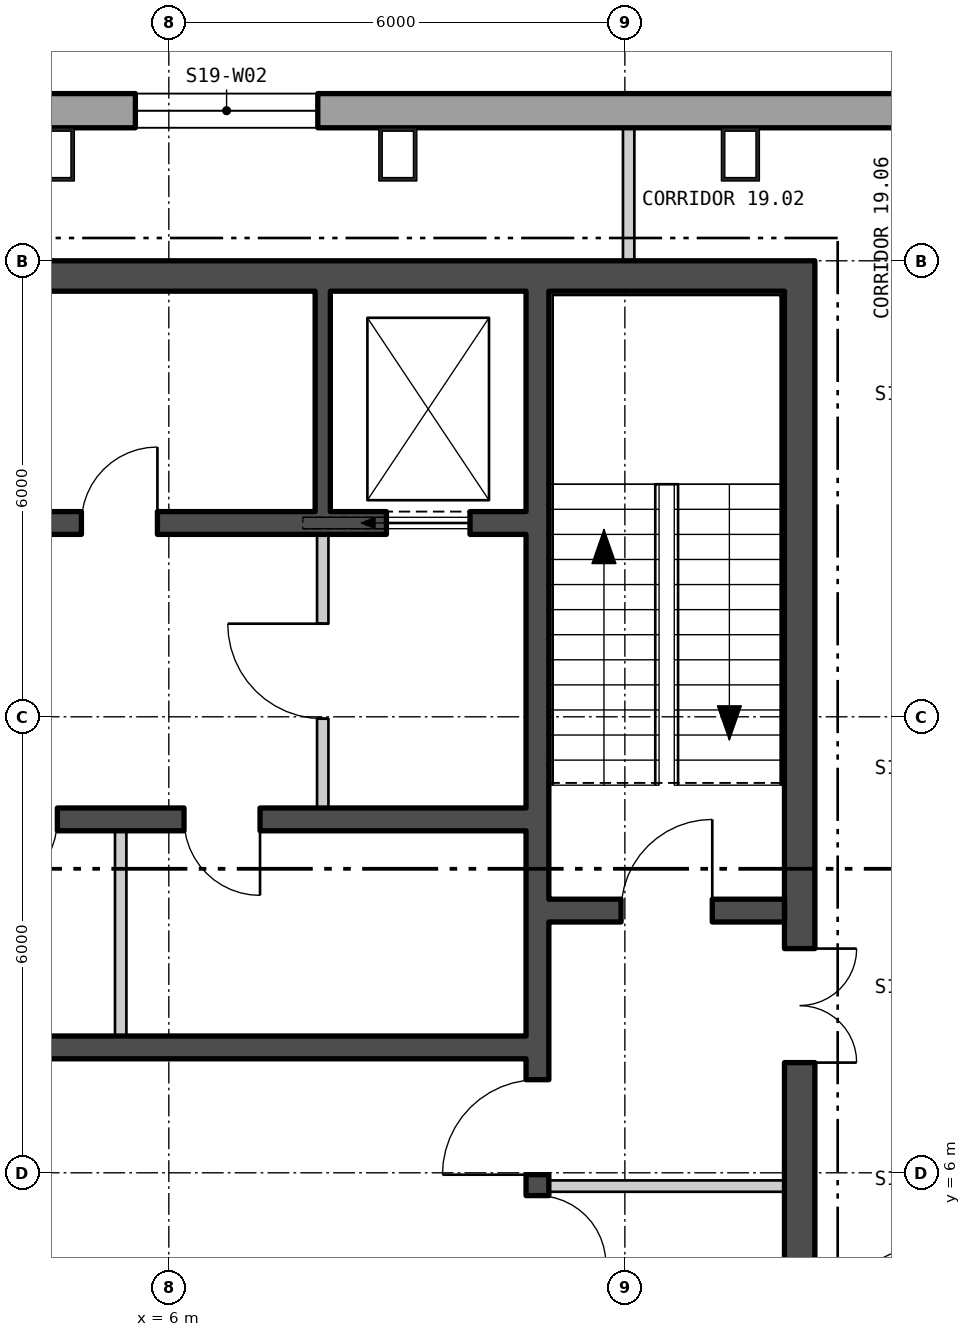
"""IFC4 building model, lengths in metres.
Left out: names, types, materials, properties, quantities, classifications, styles, units other than length and angle.
Written with IfcOpenShell. Run it as: python <this file> out.ifc"""

import sys

from ifc_helpers import new_model, si_unit, direction, frame, frame_2d, origin, origin_2d, place, context, subcontext, project, spatial, polyline, rectangle, hollow_rectangle, outline, extrude, element, fill, save


model = new_model("IFC4")
c1 = context("Model", 3, precision=1e-05, world=origin(), true_north=direction((0.0, 1.0)))
c2 = subcontext(c1, "Body", "Model", "MODEL_VIEW")
j1 = project(units=[si_unit("LENGTHUNIT", "METRE"), si_unit("PLANEANGLEUNIT", "RADIAN")], contexts=[c1])
p1 = place(None, origin())
s1 = spatial("IfcSite", under=j1, at=p1, CompositionType="ELEMENT")
p2 = place(p1, origin())
s2 = spatial("IfcBuilding", under=s1, at=p2, CompositionType="ELEMENT")
p3 = place(p2, frame((0.0, 0.0, 257.1)))
s3 = spatial("IfcBuildingStorey", under=s2, at=p3, CompositionType="ELEMENT", Elevation=257.1)
for number, where, z_axis, x_axis in (
    (1, (13.52, 19.4, 0.0), (0.0, 0.0, 1.0), (-1.0, 0.0, 0.0)),
    (2, (9.013, 19.4, 0.0), (0.0, 0.0, 1.0), (-1.0, 0.0, 0.0)),
    (3, (4.507, 19.4, 0.0), (0.0, 0.0, 1.0), (-1.0, 0.0, 0.0)),
):
    element("IfcColumn", number, at=place(p3, frame(where, z_axis=z_axis, x_axis=x_axis)), inside=s3, PredefinedType="COLUMN", context=c2, shape_type="SweptSolid", body=[
        extrude(hollow_rectangle(XDim=0.5, YDim=0.7, WallThickness=0.045, at=origin_2d()), origin(), (0.0, 0.0, 1.0), 3.9),
    ])
p4 = place(p3, frame((22.865, 19.975, -0.4), z_axis=(0.0, 0.0, 1.0), x_axis=(-1.0, 0.0, 0.0)))
e4 = element("IfcWall", 4, at=p4, inside=s3, PredefinedType="SOLIDWALL", context=c2, shape_type="SweptSolid", body=[
    extrude(outline(polyline([(-0.13, -0.225), (45.86, -0.225), (45.6, 0.225), (0.13, 0.225), (-0.13, -0.225)])), origin(), (0.0, 0.0, 1.0), 3.9),
])
p5 = place(p4, frame((1.424, 0.0, 1.3)))
e5 = element("IfcOpeningElement", 5, at=p5, cuts=e4, PredefinedType="OPENING", context=c2, shape_type="SweptSolid", body=[
    extrude(rectangle(XDim=2.4, YDim=2.0, at=frame_2d((1.2, 1.0))), frame((0.0, 0.235, 0.0), z_axis=(0.0, -1.0, 0.0), x_axis=(1.0, 0.0, 0.0)), (0.0, 0.0, 1.0), 0.47),
])
p6 = place(p4, frame((14.905, 0.0, 1.3)))
e6 = element("IfcOpeningElement", 6, at=p6, cuts=e4, PredefinedType="OPENING", context=c2, shape_type="SweptSolid", body=[
    extrude(rectangle(XDim=2.4, YDim=2.0, at=frame_2d((1.2, 1.0))), frame((0.0, 0.235, 0.0), z_axis=(0.0, -1.0, 0.0), x_axis=(1.0, 0.0, 0.0)), (0.0, 0.0, 1.0), 0.47),
])
p7 = place(p4, frame((19.412, 0.0, 1.3)))
e7 = element("IfcOpeningElement", 7, at=p7, cuts=e4, PredefinedType="OPENING", context=c2, shape_type="SweptSolid", body=[
    extrude(rectangle(XDim=2.4, YDim=2.0, at=frame_2d((1.2, 1.0))), frame((0.0, 0.235, 0.0), z_axis=(0.0, -1.0, 0.0), x_axis=(1.0, 0.0, 0.0)), (0.0, 0.0, 1.0), 0.47),
])
p8 = place(p4, frame((23.918, 0.0, 1.3)))
e8 = element("IfcOpeningElement", 8, at=p8, cuts=e4, PredefinedType="OPENING", context=c2, shape_type="SweptSolid", body=[
    extrude(rectangle(XDim=2.4, YDim=2.0, at=frame_2d((1.2, 1.0))), frame((0.0, 0.235, 0.0), z_axis=(0.0, -1.0, 0.0), x_axis=(1.0, 0.0, 0.0)), (0.0, 0.0, 1.0), 0.47),
])
p9 = place(p4, frame((28.425, 0.0, 1.3)))
e9 = element("IfcOpeningElement", 9, at=p9, cuts=e4, PredefinedType="OPENING", context=c2, shape_type="SweptSolid", body=[
    extrude(rectangle(XDim=2.4, YDim=2.0, at=frame_2d((1.2, 1.0))), frame((0.0, 0.235, 0.0), z_axis=(0.0, -1.0, 0.0), x_axis=(1.0, 0.0, 0.0)), (0.0, 0.0, 1.0), 0.47),
])
p10 = place(p4, frame((32.932, 0.0, 1.3)))
e10 = element("IfcOpeningElement", 10, at=p10, cuts=e4, PredefinedType="OPENING", context=c2, shape_type="SweptSolid", body=[
    extrude(rectangle(XDim=2.4, YDim=2.0, at=frame_2d((1.2, 1.0))), frame((0.0, 0.235, 0.0), z_axis=(0.0, -1.0, 0.0), x_axis=(1.0, 0.0, 0.0)), (0.0, 0.0, 1.0), 0.47),
])
p11 = place(p4, frame((41.907, 0.0, 1.3)))
e11 = element("IfcOpeningElement", 11, at=p11, cuts=e4, PredefinedType="OPENING", context=c2, shape_type="SweptSolid", body=[
    extrude(rectangle(XDim=2.4, YDim=2.0, at=frame_2d((1.2, 1.0))), frame((0.0, 0.235, 0.0), z_axis=(0.0, -1.0, 0.0), x_axis=(1.0, 0.0, 0.0)), (0.0, 0.0, 1.0), 0.47),
])
p12 = place(p3, frame((2.825, -24.522, -0.18), z_axis=(0.0, 0.0, 1.0), x_axis=(0.500000141277, 0.866025322218, 0.0)))
e12 = element("IfcWall", 12, at=p12, inside=s3, PredefinedType="SOLIDWALL", context=c2, shape_type="SweptSolid", body=[
    extrude(outline(polyline([(-0.13, -0.225), (45.86, -0.225), (45.6, 0.225), (0.13, 0.225), (-0.13, -0.225)])), origin(), (0.0, 0.0, 1.0), 3.68),
])
p13 = place(p12, frame((1.424, 0.0, 1.08)))
e13 = element("IfcOpeningElement", 13, at=p13, cuts=e12, PredefinedType="OPENING", context=c2, shape_type="SweptSolid", body=[
    extrude(rectangle(XDim=2.4, YDim=2.0, at=frame_2d((1.2, 1.0))), frame((0.0, 0.235, 0.0), z_axis=(0.0, -1.0, 0.0), x_axis=(1.0, 0.0, 0.0)), (0.0, 0.0, 1.0), 0.47),
])
p14 = place(p12, frame((5.892, 0.0, 1.08)))
e14 = element("IfcOpeningElement", 14, at=p14, cuts=e12, PredefinedType="OPENING", context=c2, shape_type="SweptSolid", body=[
    extrude(rectangle(XDim=2.4, YDim=2.0, at=frame_2d((1.2, 1.0))), frame((0.0, 0.235, 0.0), z_axis=(0.0, -1.0, 0.0), x_axis=(1.0, 0.0, 0.0)), (0.0, 0.0, 1.0), 0.47),
])
p15 = place(p12, frame((10.399, 0.0, 1.08)))
e15 = element("IfcOpeningElement", 15, at=p15, cuts=e12, PredefinedType="OPENING", context=c2, shape_type="SweptSolid", body=[
    extrude(rectangle(XDim=2.4, YDim=2.0, at=frame_2d((1.2, 1.0))), frame((0.0, 0.235, 0.0), z_axis=(0.0, -1.0, 0.0), x_axis=(1.0, 0.0, 0.0)), (0.0, 0.0, 1.0), 0.47),
])
p16 = place(p12, frame((14.905, 0.0, 1.08)))
e16 = element("IfcOpeningElement", 16, at=p16, cuts=e12, PredefinedType="OPENING", context=c2, shape_type="SweptSolid", body=[
    extrude(rectangle(XDim=2.4, YDim=2.0, at=frame_2d((1.2, 1.0))), frame((0.0, 0.235, 0.0), z_axis=(0.0, -1.0, 0.0), x_axis=(1.0, 0.0, 0.0)), (0.0, 0.0, 1.0), 0.47),
])
p17 = place(p12, frame((19.412, 0.0, 1.08)))
e17 = element("IfcOpeningElement", 17, at=p17, cuts=e12, PredefinedType="OPENING", context=c2, shape_type="SweptSolid", body=[
    extrude(rectangle(XDim=2.4, YDim=2.0, at=frame_2d((1.2, 1.0))), frame((0.0, 0.235, 0.0), z_axis=(0.0, -1.0, 0.0), x_axis=(1.0, 0.0, 0.0)), (0.0, 0.0, 1.0), 0.47),
])
p18 = place(p12, frame((28.425, 0.0, 1.08)))
e18 = element("IfcOpeningElement", 18, at=p18, cuts=e12, PredefinedType="OPENING", context=c2, shape_type="SweptSolid", body=[
    extrude(rectangle(XDim=2.4, YDim=2.0, at=frame_2d((1.2, 1.0))), frame((0.0, 0.235, 0.0), z_axis=(0.0, -1.0, 0.0), x_axis=(1.0, 0.0, 0.0)), (0.0, 0.0, 1.0), 0.47),
])
p19 = place(p12, frame((37.438, 0.0, 1.08)))
e19 = element("IfcOpeningElement", 19, at=p19, cuts=e12, PredefinedType="OPENING", context=c2, shape_type="SweptSolid", body=[
    extrude(rectangle(XDim=2.4, YDim=2.0, at=frame_2d((1.2, 1.0))), frame((0.0, 0.235, 0.0), z_axis=(0.0, -1.0, 0.0), x_axis=(1.0, 0.0, 0.0)), (0.0, 0.0, 1.0), 0.47),
])
p20 = place(p12, frame((41.907, 0.0, 1.08)))
e20 = element("IfcOpeningElement", 20, at=p20, cuts=e12, PredefinedType="OPENING", context=c2, shape_type="SweptSolid", body=[
    extrude(rectangle(XDim=2.4, YDim=2.0, at=frame_2d((1.2, 1.0))), frame((0.0, 0.235, 0.0), z_axis=(0.0, -1.0, 0.0), x_axis=(1.0, 0.0, 0.0)), (0.0, 0.0, 1.0), 0.47),
])
p21 = place(p3, frame((-14.5, 17.8, 0.0), z_axis=(0.0, 0.0, 1.0), x_axis=(1.0, 0.0, 0.0)))
e21 = element("IfcWall", 21, at=p21, inside=s3, PredefinedType="SHEAR", context=c2, shape_type="SweptSolid", body=[
    extrude(rectangle(XDim=29.0, YDim=0.4, at=frame_2d((14.5, 0.0))), origin(), (0.0, 0.0, 1.0), 3.7),
])
p22 = place(p3, frame((14.3, 4.4, 0.0), z_axis=(0.0, 0.0, 1.0), x_axis=(0.0, 1.0, 0.0)))
e22 = element("IfcWall", 22, at=p22, inside=s3, PredefinedType="SHEAR", context=c2, shape_type="SweptSolid", body=[
    extrude(rectangle(XDim=13.2, YDim=0.4, at=frame_2d((6.6, 0.0))), origin(), (0.0, 0.0, 1.0), 3.7),
])
p23 = place(p22, frame((3.05, 0.0, 0.0)))
e23 = element("IfcOpeningElement", 23, at=p23, cuts=e22, PredefinedType="OPENING", context=c2, shape_type="SweptSolid", body=[
    extrude(rectangle(XDim=1.5, YDim=2.1, at=frame_2d((0.75, 1.05))), frame((0.0, 0.21, 0.0), z_axis=(0.0, -1.0, 0.0), x_axis=(1.0, 0.0, 0.0)), (0.0, 0.0, 1.0), 0.42),
])
p24 = place(p3, frame((10.85, 4.4, 0.0), z_axis=(0.0, 0.0, 1.0), x_axis=(0.0, 1.0, 0.0)))
e24 = element("IfcWall", 24, at=p24, inside=s3, PredefinedType="SHEAR", context=c2, shape_type="SweptSolid", body=[
    extrude(rectangle(XDim=13.2, YDim=0.3, at=frame_2d((6.6, 0.0))), origin(), (0.0, 0.0, 1.0), 3.7),
])
p25 = place(p24, frame((1.575, 0.0, 0.0)))
e25 = element("IfcOpeningElement", 25, at=p25, cuts=e24, PredefinedType="OPENING", context=c2, shape_type="SweptSolid", body=[
    extrude(rectangle(XDim=1.25, YDim=2.1, at=frame_2d((0.625, 1.05))), frame((0.0, 0.16, 0.0), z_axis=(0.0, -1.0, 0.0), x_axis=(1.0, 0.0, 0.0)), (0.0, 0.0, 1.0), 0.32),
])
p26 = place(p24, frame((0.4, 0.0, 0.0)))
e26 = element("IfcOpeningElement", 26, at=p26, cuts=e24, PredefinedType="OPENING", context=c2, shape_type="SweptSolid", body=[
    extrude(rectangle(XDim=0.9, YDim=2.1, at=frame_2d((0.45, 1.05))), frame((0.0, 0.16, 0.0), z_axis=(0.0, -1.0, 0.0), x_axis=(1.0, 0.0, 0.0)), (0.0, 0.0, 1.0), 0.32),
])
p27 = place(p3, frame((11.0, 9.45, 0.0), z_axis=(0.0, 0.0, 1.0), x_axis=(1.0, 0.0, 0.0)))
e27 = element("IfcWall", 27, at=p27, inside=s3, PredefinedType="SHEAR", context=c2, shape_type="SweptSolid", body=[
    extrude(rectangle(XDim=3.1, YDim=0.3, at=frame_2d((1.55, 0.0))), origin(), (0.0, 0.0, 1.0), 3.7),
])
p28 = place(p27, frame((0.95, 0.0, 0.0)))
e28 = element("IfcOpeningElement", 28, at=p28, cuts=e27, PredefinedType="OPENING", context=c2, shape_type="SweptSolid", body=[
    extrude(rectangle(XDim=1.2, YDim=2.1, at=frame_2d((0.6, 1.05))), frame((0.0, 0.16, 0.0), z_axis=(0.0, -1.0, 0.0), x_axis=(1.0, 0.0, 0.0)), (0.0, 0.0, 1.0), 0.32),
])
p29 = place(p3, frame((-10.7, 14.55, 0.0), z_axis=(0.0, 0.0, 1.0), x_axis=(1.0, 0.0, 0.0)))
e29 = element("IfcWall", 29, at=p29, inside=s3, PredefinedType="SHEAR", context=c2, shape_type="SweptSolid", body=[
    extrude(rectangle(XDim=21.4, YDim=0.3, at=frame_2d((10.7, 0.0))), origin(), (0.0, 0.0, 1.0), 3.7),
])
p30 = place(p29, frame((0.738, 0.0, 0.0)))
e30 = element("IfcOpeningElement", 30, at=p30, cuts=e29, PredefinedType="OPENING", context=c2, shape_type="SweptSolid", body=[
    extrude(rectangle(XDim=1.1, YDim=2.1, at=frame_2d((0.55, 1.05))), frame((0.0, 0.16, 0.0), z_axis=(0.0, -1.0, 0.0), x_axis=(1.0, 0.0, 0.0)), (0.0, 0.0, 1.0), 0.32),
])
p31 = place(p29, frame((3.462, 0.0, 0.0)))
e31 = element("IfcOpeningElement", 31, at=p31, cuts=e29, PredefinedType="OPENING", context=c2, shape_type="SweptSolid", body=[
    extrude(rectangle(XDim=1.1, YDim=2.1, at=frame_2d((0.55, 1.05))), frame((0.0, 0.16, 0.0), z_axis=(0.0, -1.0, 0.0), x_axis=(1.0, 0.0, 0.0)), (0.0, 0.0, 1.0), 0.32),
])
p32 = place(p29, frame((6.138, 0.0, 0.0)))
e32 = element("IfcOpeningElement", 32, at=p32, cuts=e29, PredefinedType="OPENING", context=c2, shape_type="SweptSolid", body=[
    extrude(rectangle(XDim=1.1, YDim=2.1, at=frame_2d((0.55, 1.05))), frame((0.0, 0.16, 0.0), z_axis=(0.0, -1.0, 0.0), x_axis=(1.0, 0.0, 0.0)), (0.0, 0.0, 1.0), 0.32),
])
p33 = place(p29, frame((8.812, 0.0, 0.0)))
e33 = element("IfcOpeningElement", 33, at=p33, cuts=e29, PredefinedType="OPENING", context=c2, shape_type="SweptSolid", body=[
    extrude(rectangle(XDim=1.1, YDim=2.1, at=frame_2d((0.55, 1.05))), frame((0.0, 0.16, 0.0), z_axis=(0.0, -1.0, 0.0), x_axis=(1.0, 0.0, 0.0)), (0.0, 0.0, 1.0), 0.32),
])
p34 = place(p29, frame((19.562, 0.0, 0.0)))
e34 = element("IfcOpeningElement", 34, at=p34, cuts=e29, PredefinedType="OPENING", context=c2, shape_type="SweptSolid", body=[
    extrude(rectangle(XDim=1.1, YDim=2.1, at=frame_2d((0.55, 1.05))), frame((0.0, 0.16, 0.0), z_axis=(0.0, -1.0, 0.0), x_axis=(1.0, 0.0, 0.0)), (0.0, 0.0, 1.0), 0.32),
])
p35 = place(p29, frame((11.537, 0.0, 0.0)))
e35 = element("IfcOpeningElement", 35, at=p35, cuts=e29, PredefinedType="OPENING", context=c2, shape_type="SweptSolid", body=[
    extrude(rectangle(XDim=1.0, YDim=2.1, at=frame_2d((0.5, 1.05))), frame((0.0, 0.16, 0.0), z_axis=(0.0, -1.0, 0.0), x_axis=(1.0, 0.0, 0.0)), (0.0, 0.0, 1.0), 0.32),
])
p36 = place(p29, frame((15.55, 0.0, 0.0)))
e36 = element("IfcOpeningElement", 36, at=p36, cuts=e29, PredefinedType="OPENING", context=c2, shape_type="SweptSolid", body=[
    extrude(rectangle(XDim=1.0, YDim=2.1, at=frame_2d((0.5, 1.05))), frame((0.0, 0.16, 0.0), z_axis=(0.0, -1.0, 0.0), x_axis=(1.0, 0.0, 0.0)), (0.0, 0.0, 1.0), 0.32),
])
p37 = place(p3, frame((2.6, 10.65, 0.0), z_axis=(0.0, 0.0, 1.0), x_axis=(1.0, 0.0, 0.0)))
e37 = element("IfcWall", 37, at=p37, inside=s3, PredefinedType="SHEAR", context=c2, shape_type="SweptSolid", body=[
    extrude(rectangle(XDim=8.1, YDim=0.3, at=frame_2d((4.05, 0.0))), origin(), (0.0, 0.0, 1.0), 3.7),
])
p38 = place(p37, frame((0.933, 0.0, 0.0)))
e38 = element("IfcOpeningElement", 38, at=p38, cuts=e37, PredefinedType="OPENING", context=c2, shape_type="SweptSolid", body=[
    extrude(rectangle(XDim=1.0, YDim=2.1, at=frame_2d((0.5, 1.05))), frame((0.0, 0.16, 0.0), z_axis=(0.0, -1.0, 0.0), x_axis=(1.0, 0.0, 0.0)), (0.0, 0.0, 1.0), 0.32),
])
p39 = place(p37, frame((3.6, 0.0, 0.0)))
e39 = element("IfcOpeningElement", 39, at=p39, cuts=e37, PredefinedType="OPENING", context=c2, shape_type="SweptSolid", body=[
    extrude(rectangle(XDim=1.0, YDim=2.1, at=frame_2d((0.5, 1.05))), frame((0.0, 0.16, 0.0), z_axis=(0.0, -1.0, 0.0), x_axis=(1.0, 0.0, 0.0)), (0.0, 0.0, 1.0), 0.32),
])
p40 = place(p3, frame((2.6, 7.65, 0.0), z_axis=(0.0, 0.0, 1.0), x_axis=(1.0, 0.0, 0.0)))
e40 = element("IfcWall", 40, at=p40, inside=s3, PredefinedType="SHEAR", context=c2, shape_type="SweptSolid", body=[
    extrude(rectangle(XDim=8.1, YDim=0.3, at=frame_2d((4.05, 0.0))), origin(), (0.0, 0.0, 1.0), 3.7),
])
p41 = place(p3, frame((8.025, 14.7, 0.0), z_axis=(0.0, 0.0, 1.0), x_axis=(0.0, 1.0, 0.0)))
e41 = element("IfcWall", 41, at=p41, inside=s3, PredefinedType="SHEAR", context=c2, shape_type="SweptSolid", body=[
    extrude(rectangle(XDim=2.9, YDim=0.2, at=frame_2d((1.45, 0.0))), origin(), (0.0, 0.0, 1.0), 3.7),
])
p42 = place(p3, frame((5.367, 7.8, 0.0), z_axis=(0.0, 0.0, 1.0), x_axis=(0.0, 1.0, 0.0)))
e42 = element("IfcWall", 42, at=p42, inside=s3, PredefinedType="PARTITIONING", context=c2, shape_type="SweptSolid", body=[
    extrude(rectangle(XDim=2.7, YDim=0.15, at=frame_2d((1.35, 0.0))), origin(), (0.0, 0.0, 1.0), 3.7),
])
p43 = place(p3, frame((8.025, 10.8, 0.0), z_axis=(0.0, 0.0, 1.0), x_axis=(0.0, 1.0, 0.0)))
e43 = element("IfcWall", 43, at=p43, inside=s3, PredefinedType="PARTITIONING", context=c2, shape_type="SweptSolid", body=[
    extrude(rectangle(XDim=3.6, YDim=0.15, at=frame_2d((1.8, 0.0))), origin(), (0.0, 0.0, 1.0), 3.7),
])
p44 = place(p43, frame((1.175, 0.0, 0.0)))
e44 = element("IfcOpeningElement", 44, at=p44, cuts=e43, PredefinedType="OPENING", context=c2, shape_type="SweptSolid", body=[
    extrude(rectangle(XDim=1.25, YDim=2.1, at=frame_2d((0.625, 1.05))), frame((0.0, 0.085, 0.0), z_axis=(0.0, -1.0, 0.0), x_axis=(1.0, 0.0, 0.0)), (0.0, 0.0, 1.0), 0.17),
])
p45 = place(p3, frame((11.0, 5.825, 0.0), z_axis=(0.0, 0.0, 1.0), x_axis=(1.0, 0.0, 0.0)))
e45 = element("IfcWall", 45, at=p45, inside=s3, PredefinedType="PARTITIONING", context=c2, shape_type="SweptSolid", body=[
    extrude(rectangle(XDim=3.1, YDim=0.15, at=frame_2d((1.55, 0.0))), origin(), (0.0, 0.0, 1.0), 3.7),
])
p46 = place(p3, frame((12.05, 18.0, 0.0), z_axis=(0.0, 0.0, 1.0), x_axis=(0.0, 1.0, 0.0)))
e46 = element("IfcWall", 46, at=p46, inside=s3, PredefinedType="PARTITIONING", context=c2, shape_type="SweptSolid", body=[
    extrude(rectangle(XDim=1.75, YDim=0.15, at=frame_2d((0.875, 0.0))), origin(), (0.0, 0.0, 1.0), 3.7),
])
p47 = place(p6, origin())
e47 = element("IfcWindow", 47, at=p47, inside=s3, PartitioningType="SINGLE_PANEL", PredefinedType="WINDOW", context=c2, shape_type="SweptSolid", body=[
    extrude(rectangle(XDim=2.4, YDim=2.0, at=frame_2d((1.2, 1.0))), frame((0.0, 0.105, 0.0), z_axis=(0.0, -1.0, 0.0), x_axis=(1.0, 0.0, 0.0)), (0.0, 0.0, 1.0), 0.06),
])
fill(e6, e47)
p48 = place(p34, origin())
e48 = element("IfcDoor", 48, at=p48, inside=s3, OperationType="SLIDING_TO_LEFT", PredefinedType="DOOR", context=c2, shape_type="SweptSolid", body=[
    extrude(rectangle(XDim=1.1, YDim=2.1, at=frame_2d((0.55, 1.05))), frame((0.0, 0.025, 0.0), z_axis=(0.0, -1.0, 0.0), x_axis=(1.0, 0.0, 0.0)), (0.0, 0.0, 1.0), 0.05),
])
fill(e34, e48)
p49 = place(p36, origin())
e49 = element("IfcDoor", 49, at=p49, inside=s3, OperationType="SINGLE_SWING_LEFT", PredefinedType="DOOR", context=c2, shape_type="SweptSolid", body=[
    extrude(rectangle(XDim=1.0, YDim=2.1, at=frame_2d((0.5, 1.05))), frame((0.0, 0.025, 0.0), z_axis=(0.0, -1.0, 0.0), x_axis=(1.0, 0.0, 0.0)), (0.0, 0.0, 1.0), 0.05),
])
fill(e36, e49)
p50 = place(p38, origin())
e50 = element("IfcDoor", 50, at=p50, inside=s3, OperationType="SINGLE_SWING_LEFT", PredefinedType="DOOR", context=c2, shape_type="SweptSolid", body=[
    extrude(rectangle(XDim=1.0, YDim=2.1, at=frame_2d((0.5, 1.05))), frame((0.0, 0.025, 0.0), z_axis=(0.0, -1.0, 0.0), x_axis=(1.0, 0.0, 0.0)), (0.0, 0.0, 1.0), 0.05),
])
fill(e38, e50)
p51 = place(p39, origin())
e51 = element("IfcDoor", 51, at=p51, inside=s3, OperationType="SINGLE_SWING_RIGHT", PredefinedType="DOOR", context=c2, shape_type="SweptSolid", body=[
    extrude(rectangle(XDim=1.0, YDim=2.1, at=frame_2d((0.5, 1.05))), frame((0.0, 0.025, 0.0), z_axis=(0.0, -1.0, 0.0), x_axis=(1.0, 0.0, 0.0)), (0.0, 0.0, 1.0), 0.05),
])
fill(e39, e51)
p52 = place(p44, origin())
e52 = element("IfcDoor", 52, at=p52, inside=s3, OperationType="SINGLE_SWING_LEFT", PredefinedType="DOOR", context=c2, shape_type="SweptSolid", body=[
    extrude(rectangle(XDim=1.25, YDim=2.1, at=frame_2d((0.625, 1.05))), frame((0.0, 0.025, 0.0), z_axis=(0.0, -1.0, 0.0), x_axis=(1.0, 0.0, 0.0)), (0.0, 0.0, 1.0), 0.05),
])
fill(e44, e52)
p53 = place(p28, origin())
e53 = element("IfcDoor", 53, at=p53, inside=s3, OperationType="SINGLE_SWING_LEFT", PredefinedType="DOOR", context=c2, shape_type="SweptSolid", body=[
    extrude(rectangle(XDim=1.2, YDim=2.1, at=frame_2d((0.6, 1.05))), frame((0.0, 0.025, 0.0), z_axis=(0.0, -1.0, 0.0), x_axis=(1.0, 0.0, 0.0)), (0.0, 0.0, 1.0), 0.05),
])
fill(e28, e53)
p54 = place(p25, origin())
e54 = element("IfcDoor", 54, at=p54, inside=s3, OperationType="SINGLE_SWING_RIGHT", PredefinedType="DOOR", context=c2, shape_type="SweptSolid", body=[
    extrude(rectangle(XDim=1.25, YDim=2.1, at=frame_2d((0.625, 1.05))), frame((0.0, 0.025, 0.0), z_axis=(0.0, -1.0, 0.0), x_axis=(1.0, 0.0, 0.0)), (0.0, 0.0, 1.0), 0.05),
])
fill(e25, e54)
p55 = place(p23, origin())
e55 = element("IfcDoor", 55, at=p55, inside=s3, OperationType="DOUBLE_DOOR_SINGLE_SWING", PredefinedType="DOOR", context=c2, shape_type="SweptSolid", body=[
    extrude(rectangle(XDim=1.5, YDim=2.1, at=frame_2d((0.75, 1.05))), frame((0.0, 0.025, 0.0), z_axis=(0.0, -1.0, 0.0), x_axis=(1.0, 0.0, 0.0)), (0.0, 0.0, 1.0), 0.05),
])
fill(e23, e55)
p56 = place(p26, origin())
e56 = element("IfcDoor", 56, at=p56, inside=s3, OperationType="SINGLE_SWING_LEFT", PredefinedType="DOOR", context=c2, shape_type="SweptSolid", body=[
    extrude(rectangle(XDim=0.9, YDim=2.1, at=frame_2d((0.45, 1.05))), frame((0.0, 0.025, 0.0), z_axis=(0.0, -1.0, 0.0), x_axis=(1.0, 0.0, 0.0)), (0.0, 0.0, 1.0), 0.05),
])
fill(e26, e56)
save(model, sys.argv[1])
